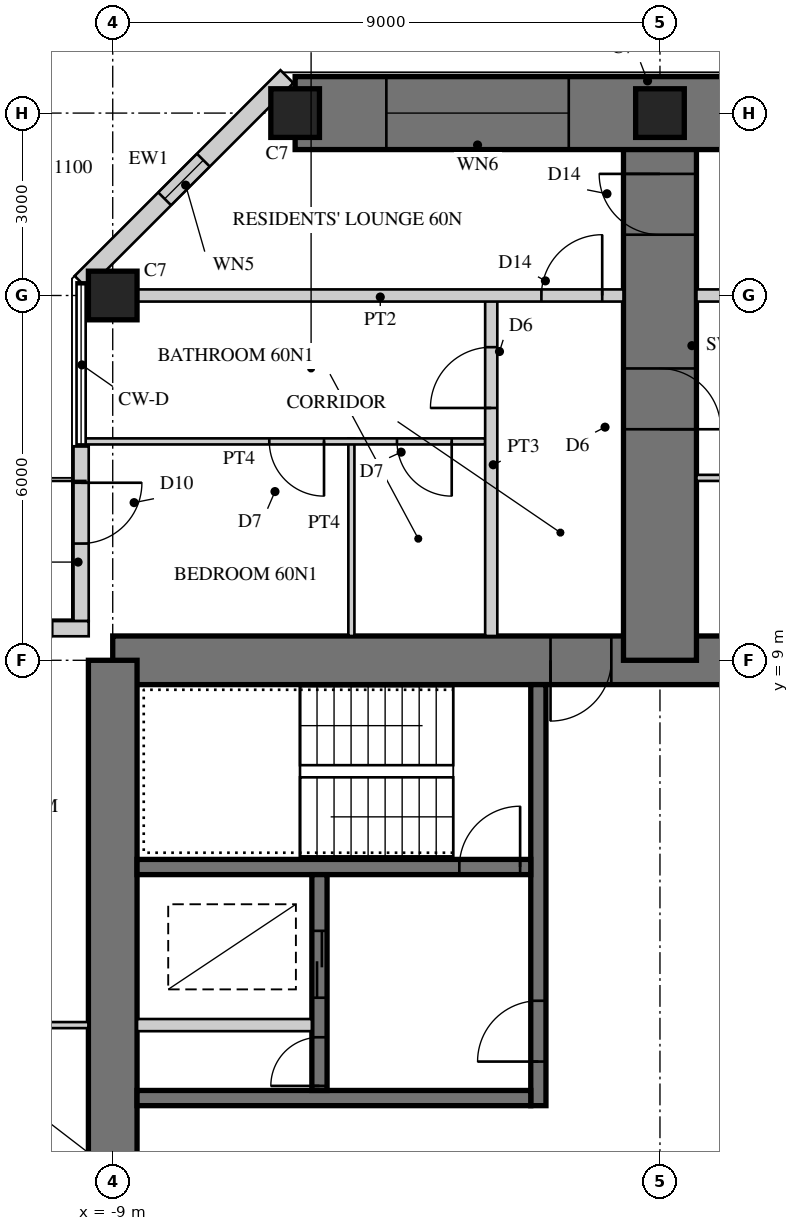
"""IFC4 building model, lengths in metres.
Left out: names, types, materials, properties, quantities, classifications, styles, units other than length and angle.
Written with IfcOpenShell. Run it as: python <this file> out.ifc"""

import sys

from ifc_helpers import new_model, si_unit, direction, frame, frame_2d, origin, origin_2d, place, context, subcontext, project, spatial, rectangle, hollow_rectangle, extrude, element, fill, save


model = new_model("IFC4")
c1 = context("Model", 3, precision=1e-05, world=origin(), true_north=direction((0.0, 1.0)))
c2 = subcontext(c1, "Body", "Model", "MODEL_VIEW")
j1 = project(units=[si_unit("LENGTHUNIT", "METRE"), si_unit("PLANEANGLEUNIT", "RADIAN")], contexts=[c1])
p1 = place(None, origin())
s1 = spatial("IfcSite", under=j1, at=p1, CompositionType="ELEMENT")
p2 = place(p1, origin())
s2 = spatial("IfcBuilding", under=s1, at=p2, CompositionType="ELEMENT")
p3 = place(p2, frame((0.0, 0.0, 235.7)))
s3 = spatial("IfcBuildingStorey", under=s2, at=p3, CompositionType="ELEMENT", Elevation=235.7)
p4 = place(p3, frame((9.0, 9.0, 0.0), z_axis=(0.0, 0.0, 1.0), x_axis=(-1.0, 0.0, 0.0)))
e1 = element("IfcWall", 1, at=p4, inside=s3, PredefinedType="SHEAR", context=c2, shape_type="SweptSolid", body=[
    extrude(rectangle(XDim=18.0, YDim=0.8, at=frame_2d((9.0, 0.0))), origin(), (0.0, 0.0, 1.0), 3.4),
])
p5 = place(p4, frame((9.8, 0.0, 0.0)))
e2 = element("IfcOpeningElement", 2, at=p5, cuts=e1, PredefinedType="OPENING", context=c2, shape_type="SweptSolid", body=[
    extrude(rectangle(XDim=1.0, YDim=2.4, at=frame_2d((0.5, 1.2))), frame((0.0, 0.41, 0.0), z_axis=(0.0, -1.0, 0.0), x_axis=(1.0, 0.0, 0.0)), (0.0, 0.0, 1.0), 0.82),
])
p6 = place(p3, frame((-9.0, 9.0, 0.0), z_axis=(0.0, 0.0, 1.0), x_axis=(0.0, -1.0, 0.0)))
e3 = element("IfcWall", 3, at=p6, inside=s3, PredefinedType="SHEAR", context=c2, shape_type="SweptSolid", body=[
    extrude(rectangle(XDim=18.0, YDim=0.8, at=frame_2d((9.0, 0.0))), origin(), (0.0, 0.0, 1.0), 3.4),
])
p7 = place(p6, frame((9.8, 0.0, 0.0)))
e4 = element("IfcOpeningElement", 4, at=p7, cuts=e3, PredefinedType="OPENING", context=c2, shape_type="SweptSolid", body=[
    extrude(rectangle(XDim=1.0, YDim=2.4, at=frame_2d((0.5, 1.2))), frame((0.0, 0.41, 0.0), z_axis=(0.0, -1.0, 0.0), x_axis=(1.0, 0.0, 0.0)), (0.0, 0.0, 1.0), 0.82),
])
p8 = place(p3, frame((-2.0, 1.675, 0.0), z_axis=(0.0, 0.0, 1.0), x_axis=(0.0, 1.0, 0.0)))
e5 = element("IfcWall", 5, at=p8, inside=s3, PredefinedType="SHEAR", context=c2, shape_type="SweptSolid", body=[
    extrude(rectangle(XDim=6.925, YDim=0.25, at=frame_2d((3.462, 0.0))), origin(), (0.0, 0.0, 1.0), 3.4),
])
p9 = place(p8, frame((0.725, 0.0, 0.0)))
e6 = element("IfcOpeningElement", 6, at=p9, cuts=e5, PredefinedType="OPENING", context=c2, shape_type="SweptSolid", body=[
    extrude(rectangle(XDim=1.0, YDim=2.1, at=frame_2d((0.5, 1.05))), frame((0.0, 0.135, 0.0), z_axis=(0.0, -1.0, 0.0), x_axis=(1.0, 0.0, 0.0)), (0.0, 0.0, 1.0), 0.27),
])
p10 = place(p3, frame((-2.125, 1.8, 0.0), z_axis=(0.0, 0.0, 1.0), x_axis=(-1.0, 0.0, 0.0)))
e7 = element("IfcWall", 7, at=p10, inside=s3, PredefinedType="SHEAR", context=c2, shape_type="SweptSolid", body=[
    extrude(rectangle(XDim=6.475, YDim=0.25, at=frame_2d((3.238, 0.0))), origin(), (0.0, 0.0, 1.0), 3.4),
])
p11 = place(p3, frame((-2.125, 5.6, 0.0), z_axis=(0.0, 0.0, 1.0), x_axis=(-1.0, 0.0, 0.0)))
e8 = element("IfcWall", 8, at=p11, inside=s3, PredefinedType="SHEAR", context=c2, shape_type="SweptSolid", body=[
    extrude(rectangle(XDim=6.475, YDim=0.25, at=frame_2d((3.238, 0.0))), origin(), (0.0, 0.0, 1.0), 3.4),
])
p12 = place(p11, frame((0.175, 0.0, 0.0)))
e9 = element("IfcOpeningElement", 9, at=p12, cuts=e8, PredefinedType="OPENING", context=c2, shape_type="SweptSolid", body=[
    extrude(rectangle(XDim=1.0, YDim=2.1, at=frame_2d((0.5, 1.05))), frame((0.0, 0.135, 0.0), z_axis=(0.0, -1.0, 0.0), x_axis=(1.0, 0.0, 0.0)), (0.0, 0.0, 1.0), 0.27),
])
p13 = place(p3, frame((-5.6, 1.925, 0.0), z_axis=(0.0, 0.0, 1.0), x_axis=(0.0, 1.0, 0.0)))
e10 = element("IfcWall", 10, at=p13, inside=s3, PredefinedType="SHEAR", context=c2, shape_type="SweptSolid", body=[
    extrude(rectangle(XDim=3.55, YDim=0.25, at=frame_2d((1.775, 0.0))), origin(), (0.0, 0.0, 1.0), 3.4),
])
p14 = place(p13, frame((1.525, 0.0, 0.0)))
e11 = element("IfcOpeningElement", 11, at=p14, cuts=e10, PredefinedType="OPENING", context=c2, shape_type="SweptSolid", body=[
    extrude(rectangle(XDim=1.1, YDim=2.2, at=frame_2d((0.55, 1.1))), frame((0.0, 0.135, 0.0), z_axis=(0.0, -1.0, 0.0), x_axis=(1.0, 0.0, 0.0)), (0.0, 0.0, 1.0), 0.27),
])
p15 = place(p13, frame((0.075, 0.0, 0.0)))
e12 = element("IfcOpeningElement", 12, at=p15, cuts=e10, PredefinedType="OPENING", context=c2, shape_type="SweptSolid", body=[
    extrude(rectangle(XDim=0.8, YDim=2.1, at=frame_2d((0.4, 1.05))), frame((0.0, 0.135, 0.0), z_axis=(0.0, -1.0, 0.0), x_axis=(1.0, 0.0, 0.0)), (0.0, 0.0, 1.0), 0.27),
])
p16 = place(p3, frame((-5.725, 3.0, 0.0), z_axis=(0.0, 0.0, 1.0), x_axis=(-1.0, 0.0, 0.0)))
e13 = element("IfcWall", 13, at=p16, inside=s3, PredefinedType="PARTITIONING", context=c2, shape_type="SweptSolid", body=[
    extrude(rectangle(XDim=2.875, YDim=0.2, at=frame_2d((1.438, 0.0))), origin(), (0.0, 0.0, 1.0), 3.4),
])
p17 = place(p3, frame((0.0, 9.0, 0.0), z_axis=(0.0, 0.0, 1.0), x_axis=(0.0, 1.0, 0.0)))
e14 = element("IfcWall", 14, at=p17, inside=s3, PredefinedType="SHEAR", context=c2, shape_type="SweptSolid", body=[
    extrude(rectangle(XDim=9.0, YDim=1.2, at=frame_2d((4.5, 0.0))), origin(), (0.0, 0.0, 1.0), 3.4),
])
p18 = place(p17, frame((3.8, 0.0, 0.0)))
e15 = element("IfcOpeningElement", 15, at=p18, cuts=e14, PredefinedType="OPENING", context=c2, shape_type="SweptSolid", body=[
    extrude(rectangle(XDim=1.0, YDim=2.15, at=frame_2d((0.5, 1.075))), frame((0.0, 0.61, 0.0), z_axis=(0.0, -1.0, 0.0), x_axis=(1.0, 0.0, 0.0)), (0.0, 0.0, 1.0), 1.22),
])
p19 = place(p17, frame((7.0, 0.0, 0.0)))
e16 = element("IfcOpeningElement", 16, at=p19, cuts=e14, PredefinedType="OPENING", context=c2, shape_type="SweptSolid", body=[
    extrude(rectangle(XDim=1.0, YDim=2.2, at=frame_2d((0.5, 1.1))), frame((0.0, 0.61, 0.0), z_axis=(0.0, -1.0, 0.0), x_axis=(1.0, 0.0, 0.0)), (0.0, 0.0, 1.0), 1.22),
])
p20 = place(p3, frame((6.0, 18.0, 0.0), z_axis=(0.0, 0.0, 1.0), x_axis=(-1.0, 0.0, 0.0)))
e17 = element("IfcWall", 17, at=p20, inside=s3, PredefinedType="SHEAR", context=c2, shape_type="SweptSolid", body=[
    extrude(rectangle(XDim=12.0, YDim=1.2, at=frame_2d((6.0, 0.0))), origin(), (0.0, 0.0, 1.0), 3.4),
])
p21 = place(p20, frame((1.5, 0.0, 0.6)))
e18 = element("IfcOpeningElement", 18, at=p21, cuts=e17, PredefinedType="OPENING", context=c2, shape_type="SweptSolid", body=[
    extrude(rectangle(XDim=3.0, YDim=2.4, at=frame_2d((1.5, 1.2))), frame((0.0, 0.61, 0.0), z_axis=(0.0, -1.0, 0.0), x_axis=(1.0, 0.0, 0.0)), (0.0, 0.0, 1.0), 1.22),
])
p22 = place(p20, frame((7.5, 0.0, 0.6)))
e19 = element("IfcOpeningElement", 19, at=p22, cuts=e17, PredefinedType="OPENING", context=c2, shape_type="SweptSolid", body=[
    extrude(rectangle(XDim=3.0, YDim=2.4, at=frame_2d((1.5, 1.2))), frame((0.0, 0.61, 0.0), z_axis=(0.0, -1.0, 0.0), x_axis=(1.0, 0.0, 0.0)), (0.0, 0.0, 1.0), 1.22),
])
for number, where, z_axis, x_axis in (
    (20, (-9.0, 15.0, 0.0), (0.0, 0.0, 1.0), (1.0, 0.0, 0.0)),
    (21, (0.0, 18.0, 0.0), (0.0, 0.0, 1.0), (1.0, 0.0, 0.0)),
    (22, (-6.0, 18.0, 0.0), (0.0, 0.0, 1.0), (1.0, 0.0, 0.0)),
):
    element("IfcColumn", number, at=place(p3, frame(where, z_axis=z_axis, x_axis=x_axis)), inside=s3, PredefinedType="COLUMN", context=c2, shape_type="SweptSolid", body=[
        extrude(rectangle(XDim=0.8, YDim=0.8, at=origin_2d()), origin(), (0.0, 0.0, 1.0), 3.4),
    ])
p23 = place(p3, frame((-6.135, 18.6, 0.0), z_axis=(0.0, 0.0, 1.0), x_axis=(-0.707081278264, -0.707132283189, 0.0)))
e23 = element("IfcWall", 23, at=p23, inside=s3, PredefinedType="SOLIDWALL", context=c2, shape_type="SweptSolid", body=[
    extrude(rectangle(XDim=4.787, YDim=0.3, at=frame_2d((2.393, 0.0))), origin(), (0.0, 0.0, 1.0), 3.22),
])
p24 = place(p23, frame((1.943, 0.0, 0.3)))
e24 = element("IfcOpeningElement", 24, at=p24, cuts=e23, PredefinedType="OPENING", context=c2, shape_type="SweptSolid", body=[
    extrude(rectangle(XDim=0.9, YDim=2.4, at=frame_2d((0.45, 1.2))), frame((0.0, 0.16, 0.0), z_axis=(0.0, -1.0, 0.0), x_axis=(1.0, 0.0, 0.0)), (0.0, 0.0, 1.0), 0.32),
])
p25 = place(p3, frame((-9.52, 12.52, 0.0), z_axis=(0.0, 0.0, 1.0), x_axis=(0.0, -1.0, 0.0)))
e25 = element("IfcWall", 25, at=p25, inside=s3, PredefinedType="SOLIDWALL", context=c2, shape_type="SweptSolid", body=[
    extrude(rectangle(XDim=2.875, YDim=0.25, at=frame_2d((1.438, 0.0))), origin(), (0.0, 0.0, 1.0), 3.22),
])
p26 = place(p25, frame((0.6, 0.0, 0.0)))
e26 = element("IfcOpeningElement", 26, at=p26, cuts=e25, PredefinedType="OPENING", context=c2, shape_type="SweptSolid", body=[
    extrude(rectangle(XDim=1.0, YDim=2.2, at=frame_2d((0.5, 1.1))), frame((0.0, 0.135, 0.0), z_axis=(0.0, -1.0, 0.0), x_axis=(1.0, 0.0, 0.0)), (0.0, 0.0, 1.0), 0.27),
])
p27 = place(p3, frame((-9.395, 9.52, 0.0), z_axis=(0.0, 0.0, 1.0), x_axis=(-1.0, 0.0, 0.0)))
e27 = element("IfcWall", 27, at=p27, inside=s3, PredefinedType="SOLIDWALL", context=c2, shape_type="SweptSolid", body=[
    extrude(rectangle(XDim=3.125, YDim=0.25, at=frame_2d((1.562, 0.0))), origin(), (0.0, 0.0, 1.0), 3.22),
])
p28 = place(p27, frame((0.6, 0.0, 0.0)))
e28 = element("IfcOpeningElement", 28, at=p28, cuts=e27, PredefinedType="OPENING", context=c2, shape_type="SweptSolid", body=[
    extrude(rectangle(XDim=1.0, YDim=2.2, at=frame_2d((0.5, 1.1))), frame((0.0, 0.135, 0.0), z_axis=(0.0, -1.0, 0.0), x_axis=(1.0, 0.0, 0.0)), (0.0, 0.0, 1.0), 0.27),
])
p29 = place(p3, frame((-5.075, 9.4, 0.0), z_axis=(0.0, 0.0, 1.0), x_axis=(0.0, 1.0, 0.0)))
e29 = element("IfcWall", 29, at=p29, inside=s3, PredefinedType="PARTITIONING", context=c2, shape_type="SweptSolid", body=[
    extrude(rectangle(XDim=3.25, YDim=0.1, at=frame_2d((1.625, 0.0))), origin(), (0.0, 0.0, 1.0), 3.22),
])
p30 = place(p3, frame((-2.875, 12.6, 0.0), z_axis=(0.0, 0.0, 1.0), x_axis=(-1.0, 0.0, 0.0)))
e30 = element("IfcWall", 30, at=p30, inside=s3, PredefinedType="PARTITIONING", context=c2, shape_type="SweptSolid", body=[
    extrude(rectangle(XDim=6.605, YDim=0.1, at=frame_2d((3.302, 0.0))), origin(), (0.0, 0.0, 1.0), 3.22),
])
p31 = place(p30, frame((0.55, 0.0, 0.0)))
e31 = element("IfcOpeningElement", 31, at=p31, cuts=e30, PredefinedType="OPENING", context=c2, shape_type="SweptSolid", body=[
    extrude(rectangle(XDim=0.9, YDim=2.1, at=frame_2d((0.45, 1.05))), frame((0.0, 0.06, 0.0), z_axis=(0.0, -1.0, 0.0), x_axis=(1.0, 0.0, 0.0)), (0.0, 0.0, 1.0), 0.12),
])
p32 = place(p30, frame((2.65, 0.0, 0.0)))
e32 = element("IfcOpeningElement", 32, at=p32, cuts=e30, PredefinedType="OPENING", context=c2, shape_type="SweptSolid", body=[
    extrude(rectangle(XDim=0.9, YDim=2.1, at=frame_2d((0.45, 1.05))), frame((0.0, 0.06, 0.0), z_axis=(0.0, -1.0, 0.0), x_axis=(1.0, 0.0, 0.0)), (0.0, 0.0, 1.0), 0.12),
])
p33 = place(p3, frame((9.395, 12.0, 0.0), z_axis=(0.0, 0.0, 1.0), x_axis=(-1.0, 0.0, 0.0)))
e33 = element("IfcWall", 33, at=p33, inside=s3, PredefinedType="PARTITIONING", context=c2, shape_type="SweptSolid", body=[
    extrude(rectangle(XDim=8.795, YDim=0.1, at=frame_2d((4.397, 0.0))), origin(), (0.0, 0.0, 1.0), 3.22),
])
p34 = place(p33, frame((5.245, 0.0, 0.0)))
e34 = element("IfcOpeningElement", 34, at=p34, cuts=e33, PredefinedType="OPENING", context=c2, shape_type="SweptSolid", body=[
    extrude(rectangle(XDim=0.9, YDim=2.1, at=frame_2d((0.45, 1.05))), frame((0.0, 0.06, 0.0), z_axis=(0.0, -1.0, 0.0), x_axis=(1.0, 0.0, 0.0)), (0.0, 0.0, 1.0), 0.12),
])
p35 = place(p33, frame((7.345, 0.0, 0.0)))
e35 = element("IfcOpeningElement", 35, at=p35, cuts=e33, PredefinedType="OPENING", context=c2, shape_type="SweptSolid", body=[
    extrude(rectangle(XDim=0.9, YDim=2.1, at=frame_2d((0.45, 1.05))), frame((0.0, 0.06, 0.0), z_axis=(0.0, -1.0, 0.0), x_axis=(1.0, 0.0, 0.0)), (0.0, 0.0, 1.0), 0.12),
])
p36 = place(p3, frame((-2.775, 9.4, 0.0), z_axis=(0.0, 0.0, 1.0), x_axis=(0.0, 1.0, 0.0)))
e36 = element("IfcWall", 36, at=p36, inside=s3, PredefinedType="SOLIDWALL", context=c2, shape_type="SweptSolid", body=[
    extrude(rectangle(XDim=5.6, YDim=0.2, at=frame_2d((2.8, 0.0))), origin(), (0.0, 0.0, 1.0), 3.22),
])
p37 = place(p36, frame((3.75, 0.0, 0.0)))
e37 = element("IfcOpeningElement", 37, at=p37, cuts=e36, PredefinedType="OPENING", context=c2, shape_type="SweptSolid", body=[
    extrude(rectangle(XDim=1.0, YDim=2.15, at=frame_2d((0.5, 1.075))), frame((0.0, 0.11, 0.0), z_axis=(0.0, -1.0, 0.0), x_axis=(1.0, 0.0, 0.0)), (0.0, 0.0, 1.0), 0.22),
])
p38 = place(p3, frame((8.6, 15.0, 0.0), z_axis=(0.0, 0.0, 1.0), x_axis=(-1.0, 0.0, 0.0)))
e38 = element("IfcWall", 38, at=p38, inside=s3, PredefinedType="SOLIDWALL", context=c2, shape_type="SweptSolid", body=[
    extrude(rectangle(XDim=8.0, YDim=0.2, at=frame_2d((4.0, 0.0))), origin(), (0.0, 0.0, 1.0), 2.52),
])
p39 = place(p3, frame((-0.6, 15.0, 0.0), z_axis=(0.0, 0.0, 1.0), x_axis=(-1.0, 0.0, 0.0)))
e39 = element("IfcWall", 39, at=p39, inside=s3, PredefinedType="SOLIDWALL", context=c2, shape_type="SweptSolid", body=[
    extrude(rectangle(XDim=8.0, YDim=0.2, at=frame_2d((4.0, 0.0))), origin(), (0.0, 0.0, 1.0), 2.52),
])
p40 = place(p39, frame((0.35, 0.0, 0.0)))
e40 = element("IfcOpeningElement", 40, at=p40, cuts=e39, PredefinedType="OPENING", context=c2, shape_type="SweptSolid", body=[
    extrude(rectangle(XDim=1.0, YDim=2.2, at=frame_2d((0.5, 1.1))), frame((0.0, 0.11, 0.0), z_axis=(0.0, -1.0, 0.0), x_axis=(1.0, 0.0, 0.0)), (0.0, 0.0, 1.0), 0.22),
])
p41 = place(p3, frame((-9.4, 3.0, 0.0), z_axis=(0.0, 0.0, 1.0), x_axis=(-1.0, 0.0, 0.0)))
e41 = element("IfcWall", 41, at=p41, inside=s3, PredefinedType="PARTITIONING", context=c2, shape_type="SweptSolid", body=[
    extrude(rectangle(XDim=2.65, YDim=0.1, at=frame_2d((1.325, 0.0))), origin(), (0.0, 0.0, 1.0), 3.22),
])
p42 = place(p22, origin())
e42 = element("IfcWindow", 42, at=p42, inside=s3, PartitioningType="SINGLE_PANEL", PredefinedType="WINDOW", context=c2, shape_type="SweptSolid", body=[
    extrude(hollow_rectangle(XDim=3.0, YDim=2.4, WallThickness=0.06, at=frame_2d((1.5, 1.2))), frame((0.0, 0.03, 0.0), z_axis=(0.0, -1.0, 0.0), x_axis=(1.0, 0.0, 0.0)), (0.0, 0.0, 1.0), 0.06),
    extrude(rectangle(XDim=2.879, YDim=2.279, at=frame_2d((1.5, 1.2))), frame((0.0, 0.03, 0.0), z_axis=(0.0, -1.0, 0.0), x_axis=(1.0, 0.0, 0.0)), (0.0, 0.0, 1.0), 0.06),
])
fill(e19, e42)
p43 = place(p24, origin())
e43 = element("IfcWindow", 43, at=p43, inside=s3, PartitioningType="SINGLE_PANEL", PredefinedType="WINDOW", context=c2, shape_type="SweptSolid", body=[
    extrude(hollow_rectangle(XDim=0.9, YDim=2.4, WallThickness=0.06, at=frame_2d((0.45, 1.2))), frame((0.0, 0.03, 0.0), z_axis=(0.0, -1.0, 0.0), x_axis=(1.0, 0.0, 0.0)), (0.0, 0.0, 1.0), 0.06),
    extrude(rectangle(XDim=0.779, YDim=2.279, at=frame_2d((0.45, 1.2))), frame((0.0, 0.03, 0.0), z_axis=(0.0, -1.0, 0.0), x_axis=(1.0, 0.0, 0.0)), (0.0, 0.0, 1.0), 0.06),
])
fill(e24, e43)
p44 = place(p26, origin())
e44 = element("IfcDoor", 44, at=p44, inside=s3, OperationType="SINGLE_SWING_LEFT", PredefinedType="DOOR", context=c2, shape_type="SweptSolid", body=[
    extrude(hollow_rectangle(XDim=1.0, YDim=2.2, WallThickness=0.06, at=frame_2d((0.5, 1.1))), frame((0.0, 0.025, 0.0), z_axis=(0.0, -1.0, 0.0), x_axis=(1.0, 0.0, 0.0)), (0.0, 0.0, 1.0), 0.05),
    extrude(rectangle(XDim=0.879, YDim=2.079, at=frame_2d((0.5, 1.1))), frame((0.0, 0.025, 0.0), z_axis=(0.0, -1.0, 0.0), x_axis=(1.0, 0.0, 0.0)), (0.0, 0.0, 1.0), 0.05),
])
fill(e26, e44)
p45 = place(p28, origin())
e45 = element("IfcDoor", 45, at=p45, inside=s3, OperationType="SINGLE_SWING_RIGHT", PredefinedType="DOOR", context=c2, shape_type="SweptSolid", body=[
    extrude(hollow_rectangle(XDim=1.0, YDim=2.2, WallThickness=0.06, at=frame_2d((0.5, 1.1))), frame((0.0, 0.025, 0.0), z_axis=(0.0, -1.0, 0.0), x_axis=(1.0, 0.0, 0.0)), (0.0, 0.0, 1.0), 0.05),
    extrude(rectangle(XDim=0.879, YDim=2.079, at=frame_2d((0.5, 1.1))), frame((0.0, 0.025, 0.0), z_axis=(0.0, -1.0, 0.0), x_axis=(1.0, 0.0, 0.0)), (0.0, 0.0, 1.0), 0.05),
])
fill(e28, e45)
p46 = place(p31, origin())
e46 = element("IfcDoor", 46, at=p46, inside=s3, OperationType="SINGLE_SWING_LEFT", PredefinedType="DOOR", context=c2, shape_type="SweptSolid", body=[
    extrude(rectangle(XDim=0.9, YDim=2.1, at=frame_2d((0.45, 1.05))), frame((0.0, 0.025, 0.0), z_axis=(0.0, -1.0, 0.0), x_axis=(1.0, 0.0, 0.0)), (0.0, 0.0, 1.0), 0.05),
])
fill(e31, e46)
p47 = place(p32, origin())
e47 = element("IfcDoor", 47, at=p47, inside=s3, OperationType="SINGLE_SWING_LEFT", PredefinedType="DOOR", context=c2, shape_type="SweptSolid", body=[
    extrude(rectangle(XDim=0.9, YDim=2.1, at=frame_2d((0.45, 1.05))), frame((0.0, 0.025, 0.0), z_axis=(0.0, -1.0, 0.0), x_axis=(1.0, 0.0, 0.0)), (0.0, 0.0, 1.0), 0.05),
])
fill(e32, e47)
p48 = place(p37, origin())
e48 = element("IfcDoor", 48, at=p48, inside=s3, OperationType="SINGLE_SWING_LEFT", PredefinedType="DOOR", context=c2, shape_type="SweptSolid", body=[
    extrude(rectangle(XDim=1.0, YDim=2.15, at=frame_2d((0.5, 1.075))), frame((0.0, 0.025, 0.0), z_axis=(0.0, -1.0, 0.0), x_axis=(1.0, 0.0, 0.0)), (0.0, 0.0, 1.0), 0.05),
])
fill(e37, e48)
p49 = place(p40, frame((1.0, 0.0, 0.0), z_axis=(0.0, 0.0, 1.0), x_axis=(-1.0, 0.0, 0.0)))
e49 = element("IfcDoor", 49, at=p49, inside=s3, OperationType="SINGLE_SWING_RIGHT", PredefinedType="DOOR", context=c2, shape_type="SweptSolid", body=[
    extrude(rectangle(XDim=1.0, YDim=2.2, at=frame_2d((0.5, 1.1))), frame((0.0, 0.025, 0.0), z_axis=(0.0, -1.0, 0.0), x_axis=(1.0, 0.0, 0.0)), (0.0, 0.0, 1.0), 0.05),
])
fill(e40, e49)
p50 = place(p18, frame((1.0, 0.0, 0.0), z_axis=(0.0, 0.0, 1.0), x_axis=(-1.0, 0.0, 0.0)))
e50 = element("IfcDoor", 50, at=p50, inside=s3, OperationType="SINGLE_SWING_RIGHT", PredefinedType="DOOR", context=c2, shape_type="SweptSolid", body=[
    extrude(rectangle(XDim=1.0, YDim=2.15, at=frame_2d((0.5, 1.075))), frame((0.0, 0.025, 0.0), z_axis=(0.0, -1.0, 0.0), x_axis=(1.0, 0.0, 0.0)), (0.0, 0.0, 1.0), 0.05),
])
fill(e15, e50)
p51 = place(p19, origin())
e51 = element("IfcDoor", 51, at=p51, inside=s3, OperationType="SINGLE_SWING_RIGHT", PredefinedType="DOOR", context=c2, shape_type="SweptSolid", body=[
    extrude(rectangle(XDim=1.0, YDim=2.2, at=frame_2d((0.5, 1.1))), frame((0.0, 0.025, 0.0), z_axis=(0.0, -1.0, 0.0), x_axis=(1.0, 0.0, 0.0)), (0.0, 0.0, 1.0), 0.05),
])
fill(e16, e51)
p52 = place(p5, origin())
e52 = element("IfcDoor", 52, at=p52, inside=s3, OperationType="SINGLE_SWING_RIGHT", PredefinedType="DOOR", context=c2, shape_type="SweptSolid", body=[
    extrude(rectangle(XDim=1.0, YDim=2.4, at=frame_2d((0.5, 1.2))), frame((0.0, 0.055, 0.0), z_axis=(0.0, -1.0, 0.0), x_axis=(1.0, 0.0, 0.0)), (0.0, 0.0, 1.0), 0.05),
])
fill(e2, e52)
p53 = place(p9, origin())
e53 = element("IfcDoor", 53, at=p53, inside=s3, OperationType="SINGLE_SWING_LEFT", PredefinedType="DOOR", context=c2, shape_type="SweptSolid", body=[
    extrude(rectangle(XDim=1.0, YDim=2.1, at=frame_2d((0.5, 1.05))), frame((0.0, 0.025, 0.0), z_axis=(0.0, -1.0, 0.0), x_axis=(1.0, 0.0, 0.0)), (0.0, 0.0, 1.0), 0.05),
])
fill(e6, e53)
p54 = place(p12, frame((1.0, 0.0, 0.0), z_axis=(0.0, 0.0, 1.0), x_axis=(-1.0, 0.0, 0.0)))
e54 = element("IfcDoor", 54, at=p54, inside=s3, OperationType="SINGLE_SWING_RIGHT", PredefinedType="DOOR", context=c2, shape_type="SweptSolid", body=[
    extrude(rectangle(XDim=1.0, YDim=2.1, at=frame_2d((0.5, 1.05))), frame((0.0, 0.025, 0.0), z_axis=(0.0, -1.0, 0.0), x_axis=(1.0, 0.0, 0.0)), (0.0, 0.0, 1.0), 0.05),
])
fill(e9, e54)
p55 = place(p14, origin())
e55 = element("IfcDoor", 55, at=p55, inside=s3, OperationType="DOUBLE_DOOR_SLIDING", PredefinedType="DOOR", context=c2, shape_type="SweptSolid", body=[
    extrude(rectangle(XDim=1.1, YDim=2.2, at=frame_2d((0.55, 1.1))), frame((0.0, 0.025, 0.0), z_axis=(0.0, -1.0, 0.0), x_axis=(1.0, 0.0, 0.0)), (0.0, 0.0, 1.0), 0.05),
])
fill(e11, e55)
p56 = place(p15, origin())
e56 = element("IfcDoor", 56, at=p56, inside=s3, OperationType="SINGLE_SWING_LEFT", PredefinedType="DOOR", context=c2, shape_type="SweptSolid", body=[
    extrude(rectangle(XDim=0.8, YDim=2.1, at=frame_2d((0.4, 1.05))), frame((0.0, 0.025, 0.0), z_axis=(0.0, -1.0, 0.0), x_axis=(1.0, 0.0, 0.0)), (0.0, 0.0, 1.0), 0.05),
])
fill(e12, e56)
save(model, sys.argv[1])
